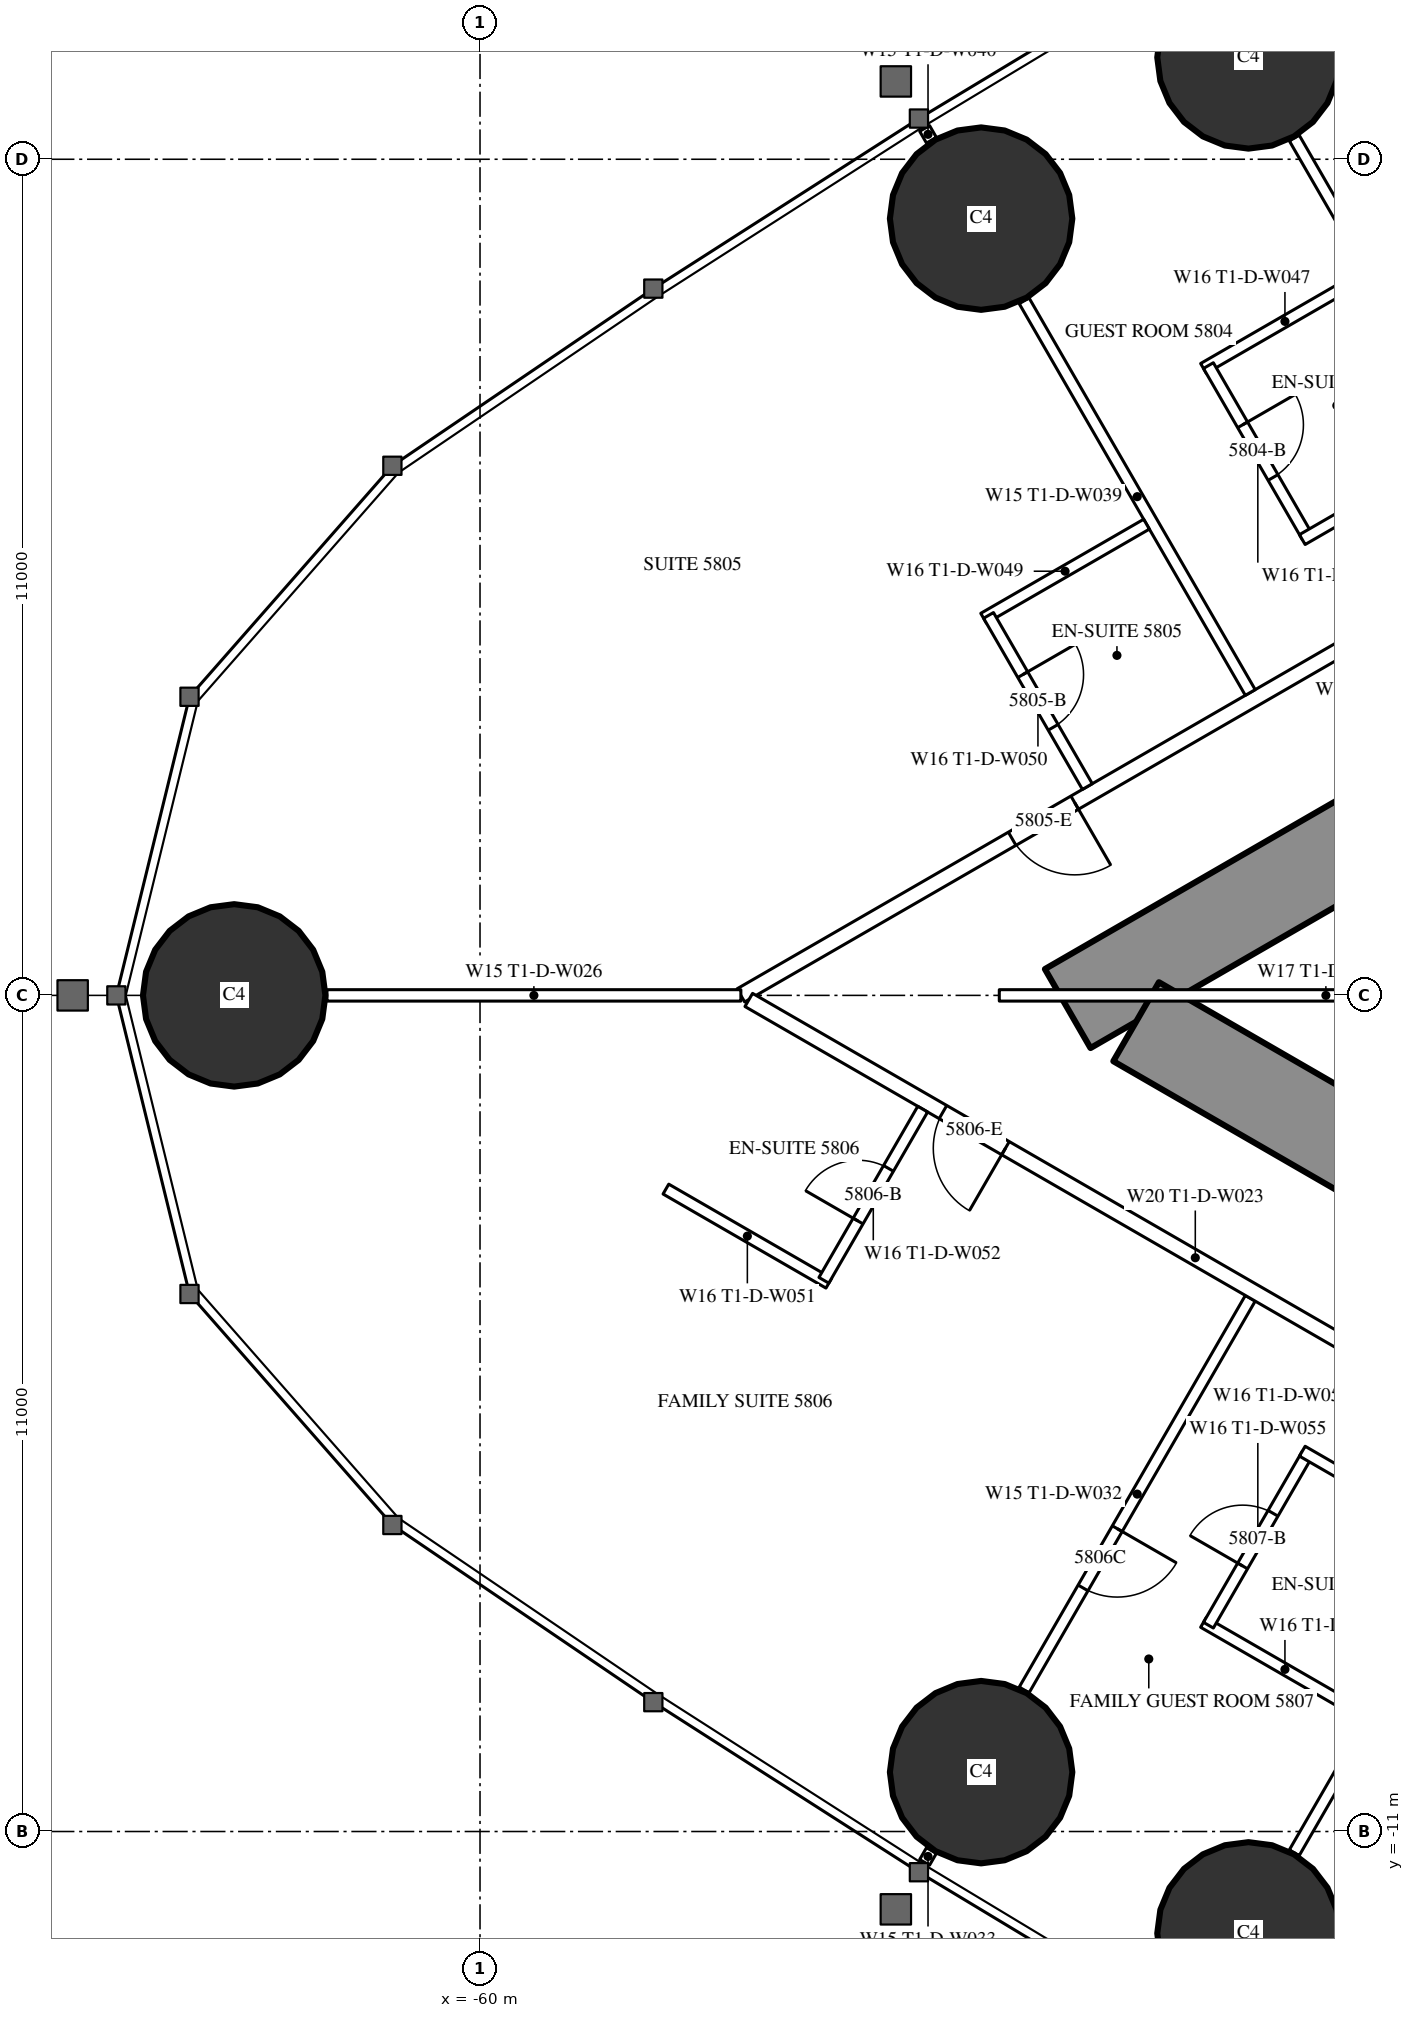
"""IFC4 building model, lengths in metres.
Left out: names, types, materials, properties, quantities, classifications, styles, units other than length and angle.
Written with IfcOpenShell. Run it as: python <this file> out.ifc"""

import sys

from ifc_helpers import new_model, si_unit, direction, frame, frame_2d, origin, origin_2d, place, context, subcontext, project, spatial, rectangle, circle, extrude, element, fill, save


model = new_model("IFC4")
c1 = context("Model", 3, precision=1e-05, world=origin(), true_north=direction((0.0, 1.0)))
c2 = subcontext(c1, "Body", "Model", "MODEL_VIEW")
j1 = project(units=[si_unit("LENGTHUNIT", "METRE"), si_unit("PLANEANGLEUNIT", "RADIAN")], contexts=[c1])
p1 = place(None, origin())
s1 = spatial("IfcSite", under=j1, at=p1, CompositionType="ELEMENT")
p2 = place(p1, origin())
s2 = spatial("IfcBuilding", under=s1, at=p2, CompositionType="ELEMENT")
p3 = place(p2, frame((0.0, 0.0, 218.9)))
s3 = spatial("IfcBuildingStorey", under=s2, at=p3, CompositionType="ELEMENT", Elevation=218.9)
for number, where, z_axis, x_axis in (
    (1, (-63.234, 0.0, 0.0), (0.0, 0.0, 1.0), (1.0, 0.0, 0.0)),
    (2, (-53.408, -10.219, 0.0), (0.0, 0.0, 1.0), (1.0, 0.0, 0.0)),
    (3, (-49.89, -12.34, 0.0), (0.0, 0.0, 1.0), (1.0, 0.0, 0.0)),
    (4, (-49.89, 12.34, 0.0), (0.0, 0.0, 1.0), (1.0, 0.0, 0.0)),
    (5, (-53.408, 10.219, 0.0), (0.0, 0.0, 1.0), (1.0, 0.0, 0.0)),
):
    element("IfcColumn", number, at=place(p3, frame(where, z_axis=z_axis, x_axis=x_axis)), inside=s3, PredefinedType="COLUMN", context=c2, shape_type="SweptSolid", body=[
        extrude(circle(Radius=1.2, at=origin_2d()), origin(), (0.0, 0.0, 1.0), 3.6),
    ])
p4 = place(p3, frame((-27.2, 14.3, 0.0), z_axis=(0.0, 0.0, 1.0), x_axis=(-0.866026593062, -0.499997940104, 0.0)))
e6 = element("IfcWall", 6, at=p4, inside=s3, PredefinedType="SHEAR", context=c2, shape_type="SweptSolid", body=[
    extrude(rectangle(XDim=28.946, YDim=1.2, at=frame_2d((14.473, 0.0))), origin(), (0.0, 0.0, 1.0), 3.6),
])
p5 = place(p4, frame((4.6, 0.0, 0.0)))
e7 = element("IfcOpeningElement", 7, at=p5, cuts=e6, PredefinedType="OPENING", context=c2, shape_type="SweptSolid", body=[
    extrude(rectangle(XDim=1.0, YDim=2.2, at=frame_2d((0.5, 1.1))), frame((0.0, 0.61, 0.0), z_axis=(0.0, -1.0, 0.0), x_axis=(1.0, 0.0, 0.0)), (0.0, 0.0, 1.0), 1.22),
])
p6 = place(p4, frame((13.395, 0.0, 0.0)))
e8 = element("IfcOpeningElement", 8, at=p6, cuts=e6, PredefinedType="OPENING", context=c2, shape_type="SweptSolid", body=[
    extrude(rectangle(XDim=1.8, YDim=2.2, at=frame_2d((0.9, 1.1))), frame((0.0, 0.61, 0.0), z_axis=(0.0, -1.0, 0.0), x_axis=(1.0, 0.0, 0.0)), (0.0, 0.0, 1.0), 1.22),
])
p7 = place(p3, frame((-27.2, -14.3, 0.0), z_axis=(0.0, 0.0, 1.0), x_axis=(-0.866024021859, 0.500002393557, 0.0)))
e9 = element("IfcWall", 9, at=p7, inside=s3, PredefinedType="SHEAR", context=c2, shape_type="SweptSolid", body=[
    extrude(rectangle(XDim=27.907, YDim=1.2, at=frame_2d((13.954, 0.0))), origin(), (0.0, 0.0, 1.0), 3.6),
])
p8 = place(p7, frame((4.6, 0.0, 0.0)))
e10 = element("IfcOpeningElement", 10, at=p8, cuts=e9, PredefinedType="OPENING", context=c2, shape_type="SweptSolid", body=[
    extrude(rectangle(XDim=1.0, YDim=2.2, at=frame_2d((0.5, 1.1))), frame((0.0, 0.61, 0.0), z_axis=(0.0, -1.0, 0.0), x_axis=(1.0, 0.0, 0.0)), (0.0, 0.0, 1.0), 1.22),
])
p9 = place(p7, frame((13.395, 0.0, 0.0)))
e11 = element("IfcOpeningElement", 11, at=p9, cuts=e9, PredefinedType="OPENING", context=c2, shape_type="SweptSolid", body=[
    extrude(rectangle(XDim=1.8, YDim=2.2, at=frame_2d((0.9, 1.1))), frame((0.0, 0.61, 0.0), z_axis=(0.0, -1.0, 0.0), x_axis=(1.0, 0.0, 0.0)), (0.0, 0.0, 1.0), 1.22),
])
p10 = place(p3, frame((-28.737, 16.068, 0.0), z_axis=(0.0, 0.0, 1.0), x_axis=(-0.866026057212, -0.499998868229, 0.0)))
e12 = element("IfcWall", 12, at=p10, inside=s3, PredefinedType="PARTITIONING", context=c2, shape_type="SweptSolid", body=[
    extrude(rectangle(XDim=32.137, YDim=0.2, at=frame_2d((16.068, 0.0))), origin(), (0.0, 0.0, 1.0), 3.35),
])
p11 = place(p10, frame((1.08, 0.0, 0.0)))
e13 = element("IfcOpeningElement", 13, at=p11, cuts=e12, PredefinedType="OPENING", context=c2, shape_type="SweptSolid", body=[
    extrude(rectangle(XDim=1.8, YDim=2.03, at=frame_2d((0.9, 1.015))), frame((0.0, 0.11, 0.0), z_axis=(0.0, -1.0, 0.0), x_axis=(1.0, 0.0, 0.0)), (0.0, 0.0, 1.0), 0.22),
])
p12 = place(p10, frame((6.86, 0.0, 0.0)))
e14 = element("IfcOpeningElement", 14, at=p12, cuts=e12, PredefinedType="OPENING", context=c2, shape_type="SweptSolid", body=[
    extrude(rectangle(XDim=1.0, YDim=2.2, at=frame_2d((0.5, 1.1))), frame((0.0, 0.11, 0.0), z_axis=(0.0, -1.0, 0.0), x_axis=(1.0, 0.0, 0.0)), (0.0, 0.0, 1.0), 0.22),
])
p13 = place(p10, frame((16.418, 0.0, 0.0)))
e15 = element("IfcOpeningElement", 15, at=p13, cuts=e12, PredefinedType="OPENING", context=c2, shape_type="SweptSolid", body=[
    extrude(rectangle(XDim=0.95, YDim=2.2, at=frame_2d((0.475, 1.1))), frame((0.0, 0.11, 0.0), z_axis=(0.0, -1.0, 0.0), x_axis=(1.0, 0.0, 0.0)), (0.0, 0.0, 1.0), 0.22),
])
p14 = place(p10, frame((20.567, 0.0, 0.0)))
e16 = element("IfcOpeningElement", 16, at=p14, cuts=e12, PredefinedType="OPENING", context=c2, shape_type="SweptSolid", body=[
    extrude(rectangle(XDim=0.95, YDim=2.2, at=frame_2d((0.475, 1.1))), frame((0.0, 0.11, 0.0), z_axis=(0.0, -1.0, 0.0), x_axis=(1.0, 0.0, 0.0)), (0.0, 0.0, 1.0), 0.22),
])
p15 = place(p10, frame((27.065, 0.0, 0.0)))
e17 = element("IfcOpeningElement", 17, at=p15, cuts=e12, PredefinedType="OPENING", context=c2, shape_type="SweptSolid", body=[
    extrude(rectangle(XDim=0.95, YDim=2.2, at=frame_2d((0.475, 1.1))), frame((0.0, 0.11, 0.0), z_axis=(0.0, -1.0, 0.0), x_axis=(1.0, 0.0, 0.0)), (0.0, 0.0, 1.0), 0.22),
])
p16 = place(p3, frame((-46.274, 6.059, 0.0), z_axis=(0.0, 0.0, 1.0), x_axis=(-0.500020471368, 0.866013584312, 0.0)))
e18 = element("IfcWall", 18, at=p16, inside=s3, PredefinedType="PARTITIONING", context=c2, shape_type="SweptSolid", body=[
    extrude(rectangle(XDim=6.028, YDim=0.15, at=frame_2d((3.014, 0.0))), origin(), (0.0, 0.0, 1.0), 2.45),
])
p17 = place(p3, frame((-49.866, 3.985, 0.0), z_axis=(0.0, 0.0, 1.0), x_axis=(-0.500000694566, 0.866025002776, 0.0)))
e19 = element("IfcWall", 19, at=p17, inside=s3, PredefinedType="PARTITIONING", context=c2, shape_type="SweptSolid", body=[
    extrude(rectangle(XDim=5.95, YDim=0.15, at=frame_2d((2.975, 0.0))), origin(), (0.0, 0.0, 1.0), 2.45),
])
p18 = place(p3, frame((-54.061, 11.25, 0.0), z_axis=(0.0, 0.0, 1.0), x_axis=(-0.500391173478, 0.865799441849, 0.0)))
e20 = element("IfcWall", 20, at=p18, inside=s3, PredefinedType="PARTITIONING", context=c2, shape_type="SweptSolid", body=[
    extrude(rectangle(XDim=0.179, YDim=0.15, at=frame_2d((0.089, 0.0))), origin(), (0.0, 0.0, 1.0), 2.45),
])
p19 = place(p3, frame((-46.274, -6.059, 0.0), z_axis=(0.0, 0.0, 1.0), x_axis=(-0.500020471368, -0.866013584312, 0.0)))
e21 = element("IfcWall", 21, at=p19, inside=s3, PredefinedType="PARTITIONING", context=c2, shape_type="SweptSolid", body=[
    extrude(rectangle(XDim=6.028, YDim=0.15, at=frame_2d((3.014, 0.0))), origin(), (0.0, 0.0, 1.0), 2.45),
])
p20 = place(p3, frame((-49.866, -3.985, 0.0), z_axis=(0.0, 0.0, 1.0), x_axis=(-0.500000694566, -0.866025002776, 0.0)))
e22 = element("IfcWall", 22, at=p20, inside=s3, PredefinedType="PARTITIONING", context=c2, shape_type="SweptSolid", body=[
    extrude(rectangle(XDim=5.95, YDim=0.15, at=frame_2d((2.975, 0.0))), origin(), (0.0, 0.0, 1.0), 2.45),
])
p21 = place(p20, frame((3.5, 0.0, 0.0)))
e23 = element("IfcOpeningElement", 23, at=p21, cuts=e22, PredefinedType="OPENING", context=c2, shape_type="SweptSolid", body=[
    extrude(rectangle(XDim=0.9, YDim=2.2, at=frame_2d((0.45, 1.1))), frame((0.0, 0.085, 0.0), z_axis=(0.0, -1.0, 0.0), x_axis=(1.0, 0.0, 0.0)), (0.0, 0.0, 1.0), 0.17),
])
p22 = place(p3, frame((-54.061, -11.25, 0.0), z_axis=(0.0, 0.0, 1.0), x_axis=(-0.500391173478, -0.865799441849, 0.0)))
e24 = element("IfcWall", 24, at=p22, inside=s3, PredefinedType="PARTITIONING", context=c2, shape_type="SweptSolid", body=[
    extrude(rectangle(XDim=0.179, YDim=0.15, at=frame_2d((0.089, 0.0))), origin(), (0.0, 0.0, 1.0), 2.45),
])
p23 = place(p3, frame((-56.568, 0.0, 0.0), z_axis=(0.0, 0.0, 1.0), x_axis=(-1.0, 0.0, 0.0)))
e25 = element("IfcWall", 25, at=p23, inside=s3, PredefinedType="PARTITIONING", context=c2, shape_type="SweptSolid", body=[
    extrude(rectangle(XDim=5.446, YDim=0.15, at=frame_2d((2.723, 0.0))), origin(), (0.0, 0.0, 1.0), 2.45),
])
p24 = place(p3, frame((-44.715, -6.844, 0.0), z_axis=(0.0, 0.0, 1.0), x_axis=(-0.866025261224, 0.500000246922, 0.0)))
e26 = element("IfcWall", 26, at=p24, inside=s3, PredefinedType="PARTITIONING", context=c2, shape_type="SweptSolid", body=[
    extrude(rectangle(XDim=13.567, YDim=0.2, at=frame_2d((6.783, 0.0))), origin(), (0.0, 0.0, 1.0), 3.35),
])
p25 = place(p24, frame((9.667, 0.0, 0.0)))
e27 = element("IfcOpeningElement", 27, at=p25, cuts=e26, PredefinedType="OPENING", context=c2, shape_type="SweptSolid", body=[
    extrude(rectangle(XDim=0.95, YDim=2.2, at=frame_2d((0.475, 1.1))), frame((0.0, 0.11, 0.0), z_axis=(0.0, -1.0, 0.0), x_axis=(1.0, 0.0, 0.0)), (0.0, 0.0, 1.0), 0.22),
])
p26 = place(p24, frame((2.117, 0.0, 0.0)))
e28 = element("IfcOpeningElement", 28, at=p26, cuts=e26, PredefinedType="OPENING", context=c2, shape_type="SweptSolid", body=[
    extrude(rectangle(XDim=0.95, YDim=2.2, at=frame_2d((0.475, 1.1))), frame((0.0, 0.11, 0.0), z_axis=(0.0, -1.0, 0.0), x_axis=(1.0, 0.0, 0.0)), (0.0, 0.0, 1.0), 0.22),
])
p27 = place(p24, frame((0.5, 0.0, 0.0)))
e29 = element("IfcOpeningElement", 29, at=p27, cuts=e26, PredefinedType="OPENING", context=c2, shape_type="SweptSolid", body=[
    extrude(rectangle(XDim=0.967, YDim=2.2, at=frame_2d((0.483, 1.1))), frame((0.0, 0.11, 0.0), z_axis=(0.0, -1.0, 0.0), x_axis=(1.0, 0.0, 0.0)), (0.0, 0.0, 1.0), 0.22),
])
p28 = place(p3, frame((-48.339, 9.486, 0.0), z_axis=(0.0, 0.0, 1.0), x_axis=(-0.866006523861, -0.500032699561, 0.0)))
e30 = element("IfcWall", 30, at=p28, inside=s3, PredefinedType="PARTITIONING", context=c2, shape_type="SweptSolid", body=[
    extrude(rectangle(XDim=2.475, YDim=0.15, at=frame_2d((1.237, 0.0))), origin(), (0.0, 0.0, 1.0), 3.35),
])
p29 = place(p3, frame((-49.117, 6.034, 0.0), z_axis=(0.0, 0.0, 1.0), x_axis=(-0.500006934395, 0.866021400173, 0.0)))
e31 = element("IfcWall", 31, at=p29, inside=s3, PredefinedType="PARTITIONING", context=c2, shape_type="SweptSolid", body=[
    extrude(rectangle(XDim=2.6, YDim=0.15, at=frame_2d((1.3, 0.0))), origin(), (0.0, 0.0, 1.0), 3.35),
])
p30 = place(p29, frame((0.9, 0.0, 0.0)))
e32 = element("IfcOpeningElement", 32, at=p30, cuts=e31, PredefinedType="OPENING", context=c2, shape_type="SweptSolid", body=[
    extrude(rectangle(XDim=0.8, YDim=2.2, at=frame_2d((0.4, 1.1))), frame((0.0, 0.085, 0.0), z_axis=(0.0, -1.0, 0.0), x_axis=(1.0, 0.0, 0.0)), (0.0, 0.0, 1.0), 0.17),
])
for number, where, z_axis, x_axis in (
    (33, (-47.039, 7.234, 0.0), (0.0, 0.0, 1.0), (-0.866, -0.5, 0.0)),
    (34, (-51.231, 6.199, 0.0), (0.0, 0.0, 1.0), (-0.866, -0.5, 0.0)),
):
    element("IfcWall", number, at=place(p3, frame(where, z_axis=z_axis, x_axis=x_axis)), inside=s3, PredefinedType="PARTITIONING", context=c2, shape_type="SweptSolid", body=[
        extrude(rectangle(XDim=2.475, YDim=0.15, at=frame_2d((1.238, 0.0))), origin(), (0.0, 0.0, 1.0), 3.35),
    ])
p31 = place(p3, frame((-52.01, 2.747, 0.0), z_axis=(0.0, 0.0, 1.0), x_axis=(-0.500006934395, 0.866021400173, 0.0)))
e35 = element("IfcWall", 35, at=p31, inside=s3, PredefinedType="PARTITIONING", context=c2, shape_type="SweptSolid", body=[
    extrude(rectangle(XDim=2.6, YDim=0.15, at=frame_2d((1.3, 0.0))), origin(), (0.0, 0.0, 1.0), 3.35),
])
p32 = place(p31, frame((0.9, 0.0, 0.0)))
e36 = element("IfcOpeningElement", 36, at=p32, cuts=e35, PredefinedType="OPENING", context=c2, shape_type="SweptSolid", body=[
    extrude(rectangle(XDim=0.8, YDim=2.2, at=frame_2d((0.4, 1.1))), frame((0.0, 0.085, 0.0), z_axis=(0.0, -1.0, 0.0), x_axis=(1.0, 0.0, 0.0)), (0.0, 0.0, 1.0), 0.17),
])
p33 = place(p3, frame((-55.411, -3.786, 0.0), z_axis=(0.0, 0.0, 1.0), x_axis=(-0.866006523861, 0.500032699561, 0.0)))
e37 = element("IfcWall", 37, at=p33, inside=s3, PredefinedType="PARTITIONING", context=c2, shape_type="SweptSolid", body=[
    extrude(rectangle(XDim=2.475, YDim=0.15, at=frame_2d((1.237, 0.0))), origin(), (0.0, 0.0, 1.0), 3.35),
])
p34 = place(p3, frame((-54.176, -1.497, 0.0), z_axis=(0.0, 0.0, 1.0), x_axis=(-0.500006934395, -0.866021400173, 0.0)))
e38 = element("IfcWall", 38, at=p34, inside=s3, PredefinedType="PARTITIONING", context=c2, shape_type="SweptSolid", body=[
    extrude(rectangle(XDim=2.6, YDim=0.15, at=frame_2d((1.3, 0.0))), origin(), (0.0, 0.0, 1.0), 3.35),
])
p35 = place(p34, frame((0.9, 0.0, 0.0)))
e39 = element("IfcOpeningElement", 39, at=p35, cuts=e38, PredefinedType="OPENING", context=c2, shape_type="SweptSolid", body=[
    extrude(rectangle(XDim=0.8, YDim=2.2, at=frame_2d((0.4, 1.1))), frame((0.0, 0.085, 0.0), z_axis=(0.0, -1.0, 0.0), x_axis=(1.0, 0.0, 0.0)), (0.0, 0.0, 1.0), 0.17),
])
p36 = place(p3, frame((-48.339, -9.486, 0.0), z_axis=(0.0, 0.0, 1.0), x_axis=(-0.866006523861, 0.500032699561, 0.0)))
e40 = element("IfcWall", 40, at=p36, inside=s3, PredefinedType="PARTITIONING", context=c2, shape_type="SweptSolid", body=[
    extrude(rectangle(XDim=2.475, YDim=0.15, at=frame_2d((1.237, 0.0))), origin(), (0.0, 0.0, 1.0), 3.35),
])
p37 = place(p3, frame((-49.117, -6.034, 0.0), z_axis=(0.0, 0.0, 1.0), x_axis=(-0.500006934395, -0.866021400173, 0.0)))
e41 = element("IfcWall", 41, at=p37, inside=s3, PredefinedType="PARTITIONING", context=c2, shape_type="SweptSolid", body=[
    extrude(rectangle(XDim=2.6, YDim=0.15, at=frame_2d((1.3, 0.0))), origin(), (0.0, 0.0, 1.0), 3.35),
])
p38 = place(p37, frame((0.9, 0.0, 0.0)))
e42 = element("IfcOpeningElement", 42, at=p38, cuts=e41, PredefinedType="OPENING", context=c2, shape_type="SweptSolid", body=[
    extrude(rectangle(XDim=0.8, YDim=2.2, at=frame_2d((0.4, 1.1))), frame((0.0, 0.085, 0.0), z_axis=(0.0, -1.0, 0.0), x_axis=(1.0, 0.0, 0.0)), (0.0, 0.0, 1.0), 0.17),
])
p39 = place(p3, frame((-47.039, -7.234, 0.0), z_axis=(0.0, 0.0, 1.0), x_axis=(-0.866073894602, 0.499916002032, 0.0)))
e43 = element("IfcWall", 43, at=p39, inside=s3, PredefinedType="PARTITIONING", context=c2, shape_type="SweptSolid", body=[
    extrude(rectangle(XDim=2.475, YDim=0.15, at=frame_2d((1.238, 0.0))), origin(), (0.0, 0.0, 1.0), 2.5),
])
p40 = place(p3, frame((-44.575, 0.0, 0.0), z_axis=(0.0, 0.0, 1.0), x_axis=(-1.0, 0.0, 0.0)))
e44 = element("IfcWall", 44, at=p40, inside=s3, PredefinedType="PARTITIONING", context=c2, shape_type="SweptSolid", body=[
    extrude(rectangle(XDim=8.593, YDim=0.15, at=frame_2d((4.297, 0.0))), origin(), (0.0, 0.0, 1.0), 2.45),
])
p41 = place(p30, origin())
e45 = element("IfcDoor", 45, at=p41, inside=s3, OperationType="SINGLE_SWING_RIGHT", PredefinedType="DOOR", context=c2, shape_type="SweptSolid", body=[
    extrude(rectangle(XDim=0.8, YDim=2.2, at=frame_2d((0.4, 1.1))), frame((0.0, 0.025, 0.0), z_axis=(0.0, -1.0, 0.0), x_axis=(1.0, 0.0, 0.0)), (0.0, 0.0, 1.0), 0.05),
])
fill(e32, e45)
p42 = place(p32, origin())
e46 = element("IfcDoor", 46, at=p42, inside=s3, OperationType="SINGLE_SWING_RIGHT", PredefinedType="DOOR", context=c2, shape_type="SweptSolid", body=[
    extrude(rectangle(XDim=0.8, YDim=2.2, at=frame_2d((0.4, 1.1))), frame((0.0, 0.025, 0.0), z_axis=(0.0, -1.0, 0.0), x_axis=(1.0, 0.0, 0.0)), (0.0, 0.0, 1.0), 0.05),
])
fill(e36, e46)
p43 = place(p15, origin())
e47 = element("IfcDoor", 47, at=p43, inside=s3, OperationType="SINGLE_SWING_LEFT", PredefinedType="DOOR", context=c2, shape_type="SweptSolid", body=[
    extrude(rectangle(XDim=0.95, YDim=2.2, at=frame_2d((0.475, 1.1))), frame((0.0, 0.025, 0.0), z_axis=(0.0, -1.0, 0.0), x_axis=(1.0, 0.0, 0.0)), (0.0, 0.0, 1.0), 0.05),
])
fill(e17, e47)
p44 = place(p35, origin())
e48 = element("IfcDoor", 48, at=p44, inside=s3, OperationType="SINGLE_SWING_RIGHT", PredefinedType="DOOR", context=c2, shape_type="SweptSolid", body=[
    extrude(rectangle(XDim=0.8, YDim=2.2, at=frame_2d((0.4, 1.1))), frame((0.0, 0.025, 0.0), z_axis=(0.0, -1.0, 0.0), x_axis=(1.0, 0.0, 0.0)), (0.0, 0.0, 1.0), 0.05),
])
fill(e39, e48)
p45 = place(p25, origin())
e49 = element("IfcDoor", 49, at=p45, inside=s3, OperationType="SINGLE_SWING_LEFT", PredefinedType="DOOR", context=c2, shape_type="SweptSolid", body=[
    extrude(rectangle(XDim=0.95, YDim=2.2, at=frame_2d((0.475, 1.1))), frame((0.0, 0.025, 0.0), z_axis=(0.0, -1.0, 0.0), x_axis=(1.0, 0.0, 0.0)), (0.0, 0.0, 1.0), 0.05),
])
fill(e27, e49)
p46 = place(p38, origin())
e50 = element("IfcDoor", 50, at=p46, inside=s3, OperationType="SINGLE_SWING_RIGHT", PredefinedType="DOOR", context=c2, shape_type="SweptSolid", body=[
    extrude(rectangle(XDim=0.8, YDim=2.2, at=frame_2d((0.4, 1.1))), frame((0.0, 0.025, 0.0), z_axis=(0.0, -1.0, 0.0), x_axis=(1.0, 0.0, 0.0)), (0.0, 0.0, 1.0), 0.05),
])
fill(e42, e50)
p47 = place(p21, origin())
e51 = element("IfcDoor", 51, at=p47, inside=s3, OperationType="SINGLE_SWING_LEFT", PredefinedType="DOOR", context=c2, shape_type="SweptSolid", body=[
    extrude(rectangle(XDim=0.9, YDim=2.2, at=frame_2d((0.45, 1.1))), frame((0.0, 0.025, 0.0), z_axis=(0.0, -1.0, 0.0), x_axis=(1.0, 0.0, 0.0)), (0.0, 0.0, 1.0), 0.05),
])
fill(e23, e51)
save(model, sys.argv[1])
